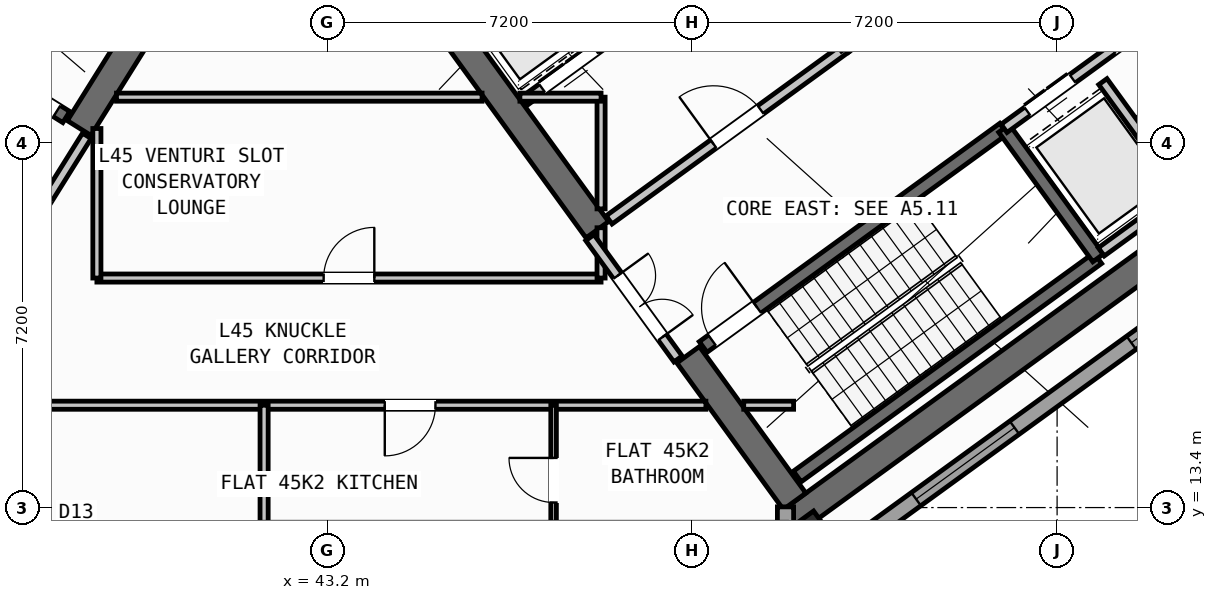
"""IFC4 building model, lengths in metres.
Left out: names, types, materials, properties, quantities, classifications, styles, units other than length and angle.
Written with IfcOpenShell. Run it as: python <this file> out.ifc"""

import sys

from ifc_helpers import new_model, si_unit, direction, frame, frame_2d, origin, origin_2d, place, context, subcontext, project, spatial, rectangle, hollow_rectangle, extrude, source, transform, mapped, element, fill, save


model = new_model("IFC4")
c1 = context("Model", 3, precision=1e-05, world=origin(), true_north=direction((0.0, 1.0)))
c2 = subcontext(c1, "Body", "Model", "MODEL_VIEW")
j1 = project(units=[si_unit("LENGTHUNIT", "METRE"), si_unit("PLANEANGLEUNIT", "RADIAN")], contexts=[c1])
p1 = place(None, origin())
s1 = spatial("IfcSite", under=j1, at=p1, CompositionType="ELEMENT")
p2 = place(p1, origin())
s2 = spatial("IfcBuilding", under=s1, at=p2, CompositionType="ELEMENT")
p3 = place(p2, frame((0.0, 0.0, 179.4)))
s3 = spatial("IfcBuildingStorey", under=s2, at=p3, CompositionType="ELEMENT", Elevation=179.4)
p4 = place(p3, frame((40.194, 23.922, 0.0), z_axis=(0.0, 0.0, 1.0), x_axis=(-0.529888438328, -0.848067357541, 0.0)))
e1 = element("IfcWall", 1, at=p4, inside=s3, PredefinedType="SHEAR", context=c2, shape_type="SweptSolid", body=[
    extrude(rectangle(XDim=3.575, YDim=0.55, at=frame_2d((1.788, 0.0))), origin(), (0.0, 0.0, 1.0), 4.55),
])
p5 = place(p3, frame((52.359, 13.14, 0.0), z_axis=(0.0, 0.0, 1.0), x_axis=(0.809014896919, 0.587788139183, 0.0)))
e2 = element("IfcWall", 2, at=p5, inside=s3, PredefinedType="SHEAR", context=c2, shape_type="SweptSolid", body=[
    extrude(rectangle(XDim=12.34, YDim=0.55, at=frame_2d((6.17, 0.0))), origin(), (0.0, 0.0, 1.0), 4.55),
])
p6 = place(p3, frame((52.42, 13.524, 0.0), z_axis=(0.0, 0.0, 1.0), x_axis=(-0.587802113096, 0.809004744015, 0.0)))
e3 = element("IfcWall", 3, at=p6, inside=s3, PredefinedType="SHEAR", context=c2, shape_type="SweptSolid", body=[
    extrude(rectangle(XDim=3.575, YDim=0.55, at=frame_2d((1.788, 0.0))), origin(), (0.0, 0.0, 1.0), 4.55),
])
p7 = place(p3, frame((48.526, 18.884, 0.0), z_axis=(0.0, 0.0, 1.0), x_axis=(-0.587764933797, 0.809031756236, 0.0)))
e4 = element("IfcWall", 4, at=p7, inside=s3, PredefinedType="SHEAR", context=c2, shape_type="SweptSolid", body=[
    extrude(rectangle(XDim=6.425, YDim=0.55, at=frame_2d((3.212, 0.0))), origin(), (0.0, 0.0, 1.0), 4.55),
])
m1 = source(origin(), c2, "Body", "SweptSolid", [
    extrude(hollow_rectangle(XDim=0.8, YDim=0.8, WallThickness=0.032, at=origin_2d()), origin(), (0.0, 0.0, 1.0), 4.8),
])
p8 = place(p3, frame((52.705, 12.773, 0.0), z_axis=(0.0, 0.0, 1.0), x_axis=(0.809016994375, 0.587785252292, 0.0)))
e5 = element("IfcColumn", 5, at=p8, inside=s3, PredefinedType="COLUMN", context=c2, shape_type="MappedRepresentation", body=[
    mapped(m1, transform((0.0, 0.0, 0.0), scale=1.0)),
])
p9 = place(p3, frame((67.454, 22.747, 0.0), z_axis=(0.0, 0.0, 1.0), x_axis=(-0.809021120468, -0.587779573171, 0.0)))
e6 = element("IfcWall", 6, at=p9, inside=s3, PredefinedType="STANDARD", context=c2, shape_type="SweptSolid", body=[
    extrude(rectangle(XDim=17.588, YDim=0.32, at=frame_2d((8.794, 0.0))), origin(), (0.0, 0.0, 1.0), 4.55),
])
p10 = place(p9, frame((1.624, 0.0, 0.0)))
e7 = element("IfcOpeningElement", 7, at=p10, cuts=e6, PredefinedType="OPENING", context=c2, shape_type="SweptSolid", body=[
    extrude(rectangle(XDim=1.05, YDim=2.15, at=frame_2d((0.525, 1.075))), frame((0.0, 0.17, 0.0), z_axis=(0.0, -1.0, 0.0), x_axis=(1.0, 0.0, 0.0)), (0.0, 0.0, 1.0), 0.34),
])
p11 = place(p9, frame((7.969, 0.0, 0.75)))
e8 = element("IfcOpeningElement", 8, at=p11, cuts=e6, PredefinedType="OPENING", context=c2, shape_type="SweptSolid", body=[
    extrude(rectangle(XDim=2.4, YDim=1.6, at=frame_2d((1.2, 0.8))), frame((0.0, 0.17, 0.0), z_axis=(0.0, -1.0, 0.0), x_axis=(1.0, 0.0, 0.0)), (0.0, 0.0, 1.0), 0.34),
])
p12 = place(p9, frame((13.219, 0.0, 0.75)))
e9 = element("IfcOpeningElement", 9, at=p12, cuts=e6, PredefinedType="OPENING", context=c2, shape_type="SweptSolid", body=[
    extrude(rectangle(XDim=2.4, YDim=1.6, at=frame_2d((1.2, 0.8))), frame((0.0, 0.17, 0.0), z_axis=(0.0, -1.0, 0.0), x_axis=(1.0, 0.0, 0.0)), (0.0, 0.0, 1.0), 0.34),
])
p13 = place(p3, frame((52.24, 13.414, 0.0), z_axis=(0.0, 0.0, 1.0), x_axis=(0.0, -1.0, 0.0)))
e10 = element("IfcWall", 10, at=p13, inside=s3, PredefinedType="STANDARD", context=c2, shape_type="SweptSolid", body=[
    extrude(rectangle(XDim=9.948, YDim=0.32, at=frame_2d((4.974, 0.0))), origin(), (0.0, 0.0, 1.0), 4.55),
])
p14 = place(p13, frame((2.268, 0.0, 0.75)))
e11 = element("IfcOpeningElement", 11, at=p14, cuts=e10, PredefinedType="OPENING", context=c2, shape_type="SweptSolid", body=[
    extrude(rectangle(XDim=2.4, YDim=1.6, at=frame_2d((1.2, 0.8))), frame((0.0, 0.17, 0.0), z_axis=(0.0, -1.0, 0.0), x_axis=(1.0, 0.0, 0.0)), (0.0, 0.0, 1.0), 0.34),
])
p15 = place(p13, frame((7.183, 0.0, 0.85)))
e12 = element("IfcOpeningElement", 12, at=p15, cuts=e10, PredefinedType="OPENING", context=c2, shape_type="SweptSolid", body=[
    extrude(rectangle(XDim=1.8, YDim=1.5, at=frame_2d((0.9, 0.75))), frame((0.0, 0.17, 0.0), z_axis=(0.0, -1.0, 0.0), x_axis=(1.0, 0.0, 0.0)), (0.0, 0.0, 1.0), 0.34),
])
p16 = place(p3, frame((38.046, 21.108, 0.0), z_axis=(0.0, 0.0, 1.0), x_axis=(-0.848054434086, 0.529909121291, 0.0)))
e13 = element("IfcWall", 13, at=p16, inside=s3, PredefinedType="SHEAR", context=c2, shape_type="SweptSolid", body=[
    extrude(rectangle(XDim=7.33, YDim=0.26, at=frame_2d((3.665, 0.0))), origin(), (0.0, 0.0, 1.0), 4.55),
])
p17 = place(p16, frame((0.22, 0.0, 0.0)))
e14 = element("IfcOpeningElement", 14, at=p17, cuts=e13, PredefinedType="OPENING", context=c2, shape_type="SweptSolid", body=[
    extrude(rectangle(XDim=1.1, YDim=2.1, at=frame_2d((0.55, 1.05))), frame((0.0, 0.14, 0.0), z_axis=(0.0, -1.0, 0.0), x_axis=(1.0, 0.0, 0.0)), (0.0, 0.0, 1.0), 0.28),
])
p18 = place(p3, frame((52.472, 14.013, 0.0), z_axis=(0.0, 0.0, 1.0), x_axis=(0.809028366311, 0.587769599847, 0.0)))
e15 = element("IfcWall", 15, at=p18, inside=s3, PredefinedType="SHEAR", context=c2, shape_type="SweptSolid", body=[
    extrude(rectangle(XDim=7.33, YDim=0.26, at=frame_2d((3.665, 0.0))), origin(), (0.0, 0.0, 1.0), 4.55),
])
p19 = place(p3, frame((50.615, 16.57, 0.0), z_axis=(0.0, 0.0, 1.0), x_axis=(0.809028366311, 0.587769599847, 0.0)))
e16 = element("IfcWall", 16, at=p19, inside=s3, PredefinedType="SHEAR", context=c2, shape_type="SweptSolid", body=[
    extrude(rectangle(XDim=7.33, YDim=0.26, at=frame_2d((3.665, 0.0))), origin(), (0.0, 0.0, 1.0), 4.55),
])
p20 = place(p19, frame((0.22, 0.0, 0.0)))
e17 = element("IfcOpeningElement", 17, at=p20, cuts=e16, PredefinedType="OPENING", context=c2, shape_type="SweptSolid", body=[
    extrude(rectangle(XDim=1.1, YDim=2.1, at=frame_2d((0.55, 1.05))), frame((0.0, 0.14, 0.0), z_axis=(0.0, -1.0, 0.0), x_axis=(1.0, 0.0, 0.0)), (0.0, 0.0, 1.0), 0.28),
])
p21 = place(p3, frame((58.41, 18.327, 0.0), z_axis=(0.0, 0.0, 1.0), x_axis=(-0.58776738483, 0.809029975545, 0.0)))
e18 = element("IfcWall", 18, at=p21, inside=s3, PredefinedType="SHEAR", context=c2, shape_type="SweptSolid", body=[
    extrude(rectangle(XDim=3.16, YDim=0.26, at=frame_2d((1.58, 0.0))), origin(), (0.0, 0.0, 1.0), 4.55),
])
p22 = place(p3, frame((47.065, 21.407, 0.0), z_axis=(0.0, 0.0, 1.0), x_axis=(0.809032984992, 0.587763242466, 0.0)))
e19 = element("IfcWall", 19, at=p22, inside=s3, PredefinedType="STANDARD", context=c2, shape_type="SweptSolid", body=[
    extrude(rectangle(XDim=3.448, YDim=0.2, at=frame_2d((1.724, 0.0))), origin(), (0.0, 0.0, 1.0), 4.54),
])
p23 = place(p22, frame((0.458, 0.0, 0.0)))
e20 = element("IfcOpeningElement", 20, at=p23, cuts=e19, PredefinedType="OPENING", context=c2, shape_type="SweptSolid", body=[
    extrude(rectangle(XDim=1.3, YDim=2.2, at=frame_2d((0.65, 1.1))), frame((0.0, 0.11, 0.0), z_axis=(0.0, -1.0, 0.0), x_axis=(1.0, 0.0, 0.0)), (0.0, 0.0, 1.0), 0.22),
])
p24 = place(p3, frame((48.758, 19.077, 0.0), z_axis=(0.0, 0.0, 1.0), x_axis=(0.809005065155, 0.587801671104, 0.0)))
e21 = element("IfcWall", 21, at=p24, inside=s3, PredefinedType="STANDARD", context=c2, shape_type="SweptSolid", body=[
    extrude(rectangle(XDim=5.768, YDim=0.2, at=frame_2d((2.884, 0.0))), origin(), (0.0, 0.0, 1.0), 4.54),
])
p25 = place(p24, frame((2.548, 0.0, 0.0)))
e22 = element("IfcOpeningElement", 22, at=p25, cuts=e21, PredefinedType="OPENING", context=c2, shape_type="SweptSolid", body=[
    extrude(rectangle(XDim=1.15, YDim=2.1, at=frame_2d((0.575, 1.05))), frame((0.0, 0.11, 0.0), z_axis=(0.0, -1.0, 0.0), x_axis=(1.0, 0.0, 0.0)), (0.0, 0.0, 1.0), 0.22),
])
p26 = place(p3, frame((56.553, 20.884, 0.0), z_axis=(0.0, 0.0, 1.0), x_axis=(0.809023564264, 0.58777620951, 0.0)))
e23 = element("IfcWall", 23, at=p26, inside=s3, PredefinedType="STANDARD", context=c2, shape_type="SweptSolid", body=[
    extrude(rectangle(XDim=3.818, YDim=0.2, at=frame_2d((1.909, 0.0))), origin(), (0.0, 0.0, 1.0), 4.54),
])
p27 = place(p26, frame((0.57, 0.0, 0.0)))
e24 = element("IfcOpeningElement", 24, at=p27, cuts=e23, PredefinedType="OPENING", context=c2, shape_type="SweptSolid", body=[
    extrude(rectangle(XDim=1.1, YDim=2.15, at=frame_2d((0.55, 1.075))), frame((0.0, 0.11, 0.0), z_axis=(0.0, -1.0, 0.0), x_axis=(1.0, 0.0, 0.0)), (0.0, 0.0, 1.0), 0.22),
])
p28 = place(p26, frame((2.65, 0.0, 0.0)))
e25 = element("IfcOpeningElement", 25, at=p28, cuts=e23, PredefinedType="OPENING", context=c2, shape_type="SweptSolid", body=[
    extrude(rectangle(XDim=0.86, YDim=2.05, at=frame_2d((0.43, 1.025))), frame((0.0, 0.11, 0.0), z_axis=(0.0, -1.0, 0.0), x_axis=(1.0, 0.0, 0.0)), (0.0, 0.0, 1.0), 0.22),
])
p29 = place(p3, frame((60.067, 19.655, 0.0), z_axis=(0.0, 0.0, 1.0), x_axis=(-0.587800520745, 0.809005900975, 0.0)))
e26 = element("IfcWall", 26, at=p29, inside=s3, PredefinedType="STANDARD", context=c2, shape_type="SweptSolid", body=[
    extrude(rectangle(XDim=2.66, YDim=0.2, at=frame_2d((1.33, 0.0))), origin(), (0.0, 0.0, 1.0), 4.54),
])
p30 = place(p3, frame((58.472, 18.447, 0.0), z_axis=(0.0, 0.0, 1.0), x_axis=(0.809018631237, 0.587782999339, 0.0)))
e27 = element("IfcWall", 27, at=p30, inside=s3, PredefinedType="STANDARD", context=c2, shape_type="SweptSolid", body=[
    extrude(rectangle(XDim=3.698, YDim=0.2, at=frame_2d((1.849, 0.0))), origin(), (0.0, 0.0, 1.0), 4.54),
])
p31 = place(p3, frame((53.425, 22.468, 0.0), z_axis=(0.0, 0.0, 1.0), x_axis=(0.809024377198, 0.587775090574, 0.0)))
e28 = element("IfcWall", 28, at=p31, inside=s3, PredefinedType="STANDARD", context=c2, shape_type="SweptSolid", body=[
    extrude(rectangle(XDim=5.418, YDim=0.2, at=frame_2d((2.709, 0.0))), origin(), (0.0, 0.0, 1.0), 4.54),
])
p32 = place(p31, frame((4.28, 0.0, 0.0)))
e29 = element("IfcOpeningElement", 29, at=p32, cuts=e28, PredefinedType="OPENING", context=c2, shape_type="SweptSolid", body=[
    extrude(rectangle(XDim=0.86, YDim=2.05, at=frame_2d((0.43, 1.025))), frame((0.0, 0.11, 0.0), z_axis=(0.0, -1.0, 0.0), x_axis=(1.0, 0.0, 0.0)), (0.0, 0.0, 1.0), 0.22),
])
p33 = place(p31, frame((1.45, 0.0, 0.0)))
e30 = element("IfcOpeningElement", 30, at=p33, cuts=e28, PredefinedType="OPENING", context=c2, shape_type="SweptSolid", body=[
    extrude(rectangle(XDim=0.86, YDim=2.05, at=frame_2d((0.43, 1.025))), frame((0.0, 0.11, 0.0), z_axis=(0.0, -1.0, 0.0), x_axis=(1.0, 0.0, 0.0)), (0.0, 0.0, 1.0), 0.22),
])
p34 = place(p3, frame((38.451, 20.737, 0.0), z_axis=(0.0, 0.0, 1.0), x_axis=(-0.529924799939, -0.848044637038, 0.0)))
e31 = element("IfcWall", 31, at=p34, inside=s3, PredefinedType="STANDARD", context=c2, shape_type="SweptSolid", body=[
    extrude(rectangle(XDim=2.96, YDim=0.2, at=frame_2d((1.48, 0.0))), origin(), (0.0, 0.0, 1.0), 4.54),
])
p35 = place(p34, frame((1.46, 0.0, 0.0)))
e32 = element("IfcOpeningElement", 32, at=p35, cuts=e31, PredefinedType="OPENING", context=c2, shape_type="SweptSolid", body=[
    extrude(rectangle(XDim=0.86, YDim=2.05, at=frame_2d((0.43, 1.025))), frame((0.0, 0.11, 0.0), z_axis=(0.0, -1.0, 0.0), x_axis=(1.0, 0.0, 0.0)), (0.0, 0.0, 1.0), 0.22),
])
p36 = place(p3, frame((35.237, 15.42, 0.0), z_axis=(0.0, 0.0, 1.0), x_axis=(1.0, 0.0, 0.0)))
e33 = element("IfcWall", 33, at=p36, inside=s3, PredefinedType="PARTITIONING", context=c2, shape_type="SweptSolid", body=[
    extrude(rectangle(XDim=15.432, YDim=0.16, at=frame_2d((7.716, 0.0))), origin(), (0.0, 0.0, 1.0), 4.54),
])
p37 = place(p36, frame((0.674, 0.0, 0.0)))
e34 = element("IfcOpeningElement", 34, at=p37, cuts=e33, PredefinedType="OPENING", context=c2, shape_type="SweptSolid", body=[
    extrude(rectangle(XDim=1.0, YDim=2.1, at=frame_2d((0.5, 1.05))), frame((0.0, 0.09, 0.0), z_axis=(0.0, -1.0, 0.0), x_axis=(1.0, 0.0, 0.0)), (0.0, 0.0, 1.0), 0.18),
])
p38 = place(p36, frame((9.094, 0.0, 0.0)))
e35 = element("IfcOpeningElement", 35, at=p38, cuts=e33, PredefinedType="OPENING", context=c2, shape_type="SweptSolid", body=[
    extrude(rectangle(XDim=1.0, YDim=2.1, at=frame_2d((0.5, 1.05))), frame((0.0, 0.09, 0.0), z_axis=(0.0, -1.0, 0.0), x_axis=(1.0, 0.0, 0.0)), (0.0, 0.0, 1.0), 0.18),
])
p39 = place(p3, frame((51.416, 15.42, 0.0), z_axis=(0.0, 0.0, 1.0), x_axis=(1.0, 0.0, 0.0)))
e36 = element("IfcWall", 36, at=p39, inside=s3, PredefinedType="PARTITIONING", context=c2, shape_type="SweptSolid", body=[
    extrude(rectangle(XDim=0.984, YDim=0.16, at=frame_2d((0.492, 0.0))), origin(), (0.0, 0.0, 1.0), 4.54),
])
p40 = place(p3, frame((38.65, 17.93, 0.0), z_axis=(0.0, 0.0, 1.0), x_axis=(1.0, 0.0, 0.0)))
e37 = element("IfcWall", 37, at=p40, inside=s3, PredefinedType="PARTITIONING", context=c2, shape_type="SweptSolid", body=[
    extrude(rectangle(XDim=9.95, YDim=0.16, at=frame_2d((4.975, 0.0))), origin(), (0.0, 0.0, 1.0), 4.54),
])
p41 = place(p40, frame((4.475, 0.0, 0.0)))
e38 = element("IfcOpeningElement", 38, at=p41, cuts=e37, PredefinedType="OPENING", context=c2, shape_type="SweptSolid", body=[
    extrude(rectangle(XDim=1.0, YDim=2.1, at=frame_2d((0.5, 1.05))), frame((0.0, 0.09, 0.0), z_axis=(0.0, -1.0, 0.0), x_axis=(1.0, 0.0, 0.0)), (0.0, 0.0, 1.0), 0.18),
])
p42 = place(p3, frame((38.65, 17.93, 0.0), z_axis=(0.0, 0.0, 1.0), x_axis=(0.0, 1.0, 0.0)))
e39 = element("IfcWall", 39, at=p42, inside=s3, PredefinedType="PARTITIONING", context=c2, shape_type="SweptSolid", body=[
    extrude(rectangle(XDim=2.951, YDim=0.16, at=frame_2d((1.476, 0.0))), origin(), (0.0, 0.0, 1.0), 4.54),
])
p43 = place(p3, frame((48.6, 17.93, 0.0), z_axis=(0.0, 0.0, 1.0), x_axis=(0.0, 1.0, 0.0)))
e40 = element("IfcWall", 40, at=p43, inside=s3, PredefinedType="PARTITIONING", context=c2, shape_type="SweptSolid", body=[
    extrude(rectangle(XDim=0.993, YDim=0.16, at=frame_2d((0.496, 0.0))), origin(), (0.0, 0.0, 1.0), 4.54),
])
p44 = place(p3, frame((48.6, 19.295, 0.0), z_axis=(0.0, 0.0, 1.0), x_axis=(0.0, 1.0, 0.0)))
e41 = element("IfcWall", 41, at=p44, inside=s3, PredefinedType="PARTITIONING", context=c2, shape_type="SweptSolid", body=[
    extrude(rectangle(XDim=2.205, YDim=0.16, at=frame_2d((1.103, 0.0))), origin(), (0.0, 0.0, 1.0), 4.54),
])
p45 = place(p3, frame((39.037, 21.5, 0.0), z_axis=(0.0, 0.0, 1.0), x_axis=(1.0, 0.0, 0.0)))
e42 = element("IfcWall", 42, at=p45, inside=s3, PredefinedType="PARTITIONING", context=c2, shape_type="SweptSolid", body=[
    extrude(rectangle(XDim=7.215, YDim=0.16, at=frame_2d((3.607, 0.0))), origin(), (0.0, 0.0, 1.0), 4.54),
])
p46 = place(p3, frame((46.998, 21.5, 0.0), z_axis=(0.0, 0.0, 1.0), x_axis=(1.0, 0.0, 0.0)))
e43 = element("IfcWall", 43, at=p46, inside=s3, PredefinedType="PARTITIONING", context=c2, shape_type="SweptSolid", body=[
    extrude(rectangle(XDim=1.602, YDim=0.16, at=frame_2d((0.801, 0.0))), origin(), (0.0, 0.0, 1.0), 4.54),
])
p47 = place(p3, frame((50.119, 16.333, 0.0), z_axis=(0.0, 0.0, 1.0), x_axis=(-0.587749856981, 0.809042709391, 0.0)))
e44 = element("IfcWall", 44, at=p47, inside=s3, PredefinedType="STANDARD", context=c2, shape_type="SweptSolid", body=[
    extrude(rectangle(XDim=2.96, YDim=0.2, at=frame_2d((1.48, 0.0))), origin(), (0.0, 0.0, 1.0), 4.54),
])
p48 = place(p47, frame((0.53, 0.0, 0.0)))
e45 = element("IfcOpeningElement", 45, at=p48, cuts=e44, PredefinedType="OPENING", context=c2, shape_type="SweptSolid", body=[
    extrude(rectangle(XDim=1.5, YDim=2.15, at=frame_2d((0.75, 1.075))), frame((0.0, 0.11, 0.0), z_axis=(0.0, -1.0, 0.0), x_axis=(1.0, 0.0, 0.0)), (0.0, 0.0, 1.0), 0.22),
])
p49 = place(p3, frame((41.95, 1.96, 0.0), z_axis=(0.0, 0.0, 1.0), x_axis=(0.0, 1.0, 0.0)))
e46 = element("IfcWall", 46, at=p49, inside=s3, PredefinedType="PARTITIONING", context=c2, shape_type="SweptSolid", body=[
    extrude(rectangle(XDim=13.46, YDim=0.16, at=frame_2d((6.73, 0.0))), origin(), (0.0, 0.0, 1.0), 4.54),
])
p50 = place(p3, frame((47.663, 1.96, 0.0), z_axis=(0.0, 0.0, 1.0), x_axis=(0.0, 1.0, 0.0)))
e47 = element("IfcWall", 47, at=p50, inside=s3, PredefinedType="PARTITIONING", context=c2, shape_type="SweptSolid", body=[
    extrude(rectangle(XDim=13.46, YDim=0.11, at=frame_2d((6.73, 0.0))), origin(), (0.0, 0.0, 1.0), 4.54),
])
p51 = place(p50, frame((6.3, 0.0, 0.0)))
e48 = element("IfcOpeningElement", 48, at=p51, cuts=e47, PredefinedType="OPENING", context=c2, shape_type="SweptSolid", body=[
    extrude(rectangle(XDim=0.92, YDim=2.08, at=frame_2d((0.46, 1.04))), frame((0.0, 0.065, 0.0), z_axis=(0.0, -1.0, 0.0), x_axis=(1.0, 0.0, 0.0)), (0.0, 0.0, 1.0), 0.13),
])
p52 = place(p50, frame((11.54, 0.0, 0.0)))
e49 = element("IfcOpeningElement", 49, at=p52, cuts=e47, PredefinedType="OPENING", context=c2, shape_type="SweptSolid", body=[
    extrude(rectangle(XDim=0.88, YDim=2.08, at=frame_2d((0.44, 1.04))), frame((0.0, 0.065, 0.0), z_axis=(0.0, -1.0, 0.0), x_axis=(1.0, 0.0, 0.0)), (0.0, 0.0, 1.0), 0.13),
])
m2 = source(origin(), c2, "Body", "SweptSolid", [
    extrude(rectangle(XDim=2.4, YDim=1.6, at=frame_2d((1.2, 0.8))), frame((0.0, 0.03, 0.0), z_axis=(0.0, -1.0, 0.0), x_axis=(1.0, 0.0, 0.0)), (0.0, 0.0, 1.0), 0.06),
])
p53 = place(p11, origin())
e50 = element("IfcWindow", 50, at=p53, inside=s3, PartitioningType="SINGLE_PANEL", PredefinedType="WINDOW", context=c2, shape_type="MappedRepresentation", body=[
    mapped(m2, transform((0.0, 0.0, 0.0), scale=1.0)),
])
fill(e8, e50)
p54 = place(p12, origin())
e51 = element("IfcWindow", 51, at=p54, inside=s3, PartitioningType="SINGLE_PANEL", PredefinedType="WINDOW", context=c2, shape_type="MappedRepresentation", body=[
    mapped(m2, transform((0.0, 0.0, 0.0), scale=1.0)),
])
fill(e9, e51)
m3 = source(origin(), c2, "Body", "SweptSolid", [
    extrude(rectangle(XDim=1.1, YDim=2.1, at=frame_2d((0.55, 1.05))), frame((0.0, 0.025, 0.0), z_axis=(0.0, -1.0, 0.0), x_axis=(1.0, 0.0, 0.0)), (0.0, 0.0, 1.0), 0.05),
])
p55 = place(p17, origin())
e52 = element("IfcDoor", 52, at=p55, inside=s3, OperationType="SINGLE_SWING_RIGHT", PredefinedType="DOOR", context=c2, shape_type="MappedRepresentation", body=[
    mapped(m3, transform((0.0, 0.0, 0.0), scale=1.0)),
])
fill(e14, e52)
p56 = place(p20, origin())
e53 = element("IfcDoor", 53, at=p56, inside=s3, OperationType="SINGLE_SWING_RIGHT", PredefinedType="DOOR", context=c2, shape_type="MappedRepresentation", body=[
    mapped(m3, transform((0.0, 0.0, 0.0), scale=1.0)),
])
fill(e17, e53)
m4 = source(origin(), c2, "Body", "SweptSolid", [
    extrude(rectangle(XDim=1.15, YDim=2.1, at=frame_2d((0.575, 1.05))), frame((0.0, 0.025, 0.0), z_axis=(0.0, -1.0, 0.0), x_axis=(1.0, 0.0, 0.0)), (0.0, 0.0, 1.0), 0.05),
])
p57 = place(p25, origin())
e54 = element("IfcDoor", 54, at=p57, inside=s3, OperationType="SINGLE_SWING_LEFT", PredefinedType="DOOR", context=c2, shape_type="MappedRepresentation", body=[
    mapped(m4, transform((0.0, 0.0, 0.0), scale=1.0)),
])
fill(e22, e54)
m5 = source(origin(), c2, "Body", "SweptSolid", [
    extrude(rectangle(XDim=1.3, YDim=2.2, at=frame_2d((0.65, 1.1))), frame((0.0, 0.025, 0.0), z_axis=(0.0, -1.0, 0.0), x_axis=(1.0, 0.0, 0.0)), (0.0, 0.0, 1.0), 0.05),
])
p58 = place(p23, origin())
e55 = element("IfcDoor", 55, at=p58, inside=s3, OperationType="DOUBLE_DOOR_SLIDING", PredefinedType="DOOR", context=c2, shape_type="MappedRepresentation", body=[
    mapped(m5, transform((0.0, 0.0, 0.0), scale=1.0)),
])
fill(e20, e55)
m6 = source(origin(), c2, "Body", "SweptSolid", [
    extrude(rectangle(XDim=1.1, YDim=2.15, at=frame_2d((0.55, 1.075))), frame((0.0, 0.025, 0.0), z_axis=(0.0, -1.0, 0.0), x_axis=(1.0, 0.0, 0.0)), (0.0, 0.0, 1.0), 0.05),
])
p59 = place(p27, origin())
e56 = element("IfcDoor", 56, at=p59, inside=s3, OperationType="DOUBLE_DOOR_SLIDING", PredefinedType="DOOR", context=c2, shape_type="MappedRepresentation", body=[
    mapped(m6, transform((0.0, 0.0, 0.0), scale=1.0)),
])
fill(e24, e56)
m7 = source(origin(), c2, "Body", "SweptSolid", [
    extrude(rectangle(XDim=1.0, YDim=2.1, at=frame_2d((0.5, 1.05))), frame((0.0, 0.025, 0.0), z_axis=(0.0, -1.0, 0.0), x_axis=(1.0, 0.0, 0.0)), (0.0, 0.0, 1.0), 0.05),
])
p60 = place(p41, origin())
e57 = element("IfcDoor", 57, at=p60, inside=s3, OperationType="SINGLE_SWING_RIGHT", PredefinedType="DOOR", context=c2, shape_type="MappedRepresentation", body=[
    mapped(m7, transform((0.0, 0.0, 0.0), scale=1.0)),
])
fill(e38, e57)
m8 = source(origin(), c2, "Body", "SweptSolid", [
    extrude(rectangle(XDim=1.5, YDim=2.15, at=frame_2d((0.75, 1.075))), frame((0.0, 0.025, 0.0), z_axis=(0.0, -1.0, 0.0), x_axis=(1.0, 0.0, 0.0)), (0.0, 0.0, 1.0), 0.05),
])
p61 = place(p48, frame((1.5, 0.0, 0.0), z_axis=(0.0, 0.0, 1.0), x_axis=(-1.0, 0.0, 0.0)))
e58 = element("IfcDoor", 58, at=p61, inside=s3, OperationType="DOUBLE_DOOR_SINGLE_SWING", PredefinedType="DOOR", context=c2, shape_type="MappedRepresentation", body=[
    mapped(m8, transform((0.0, 0.0, 0.0), scale=1.0)),
])
fill(e45, e58)
p62 = place(p38, frame((1.0, 0.0, 0.0), z_axis=(0.0, 0.0, 1.0), x_axis=(-1.0, 0.0, 0.0)))
e59 = element("IfcDoor", 59, at=p62, inside=s3, OperationType="SINGLE_SWING_RIGHT", PredefinedType="DOOR", context=c2, shape_type="MappedRepresentation", body=[
    mapped(m7, transform((0.0, 0.0, 0.0), scale=1.0)),
])
fill(e35, e59)
m9 = source(origin(), c2, "Body", "SweptSolid", [
    extrude(rectangle(XDim=0.88, YDim=2.08, at=frame_2d((0.44, 1.04))), frame((0.0, 0.025, 0.0), z_axis=(0.0, -1.0, 0.0), x_axis=(1.0, 0.0, 0.0)), (0.0, 0.0, 1.0), 0.05),
])
p63 = place(p52, origin())
e60 = element("IfcDoor", 60, at=p63, inside=s3, OperationType="SINGLE_SWING_RIGHT", PredefinedType="DOOR", context=c2, shape_type="MappedRepresentation", body=[
    mapped(m9, transform((0.0, 0.0, 0.0), scale=1.0)),
])
fill(e49, e60)
save(model, sys.argv[1])
